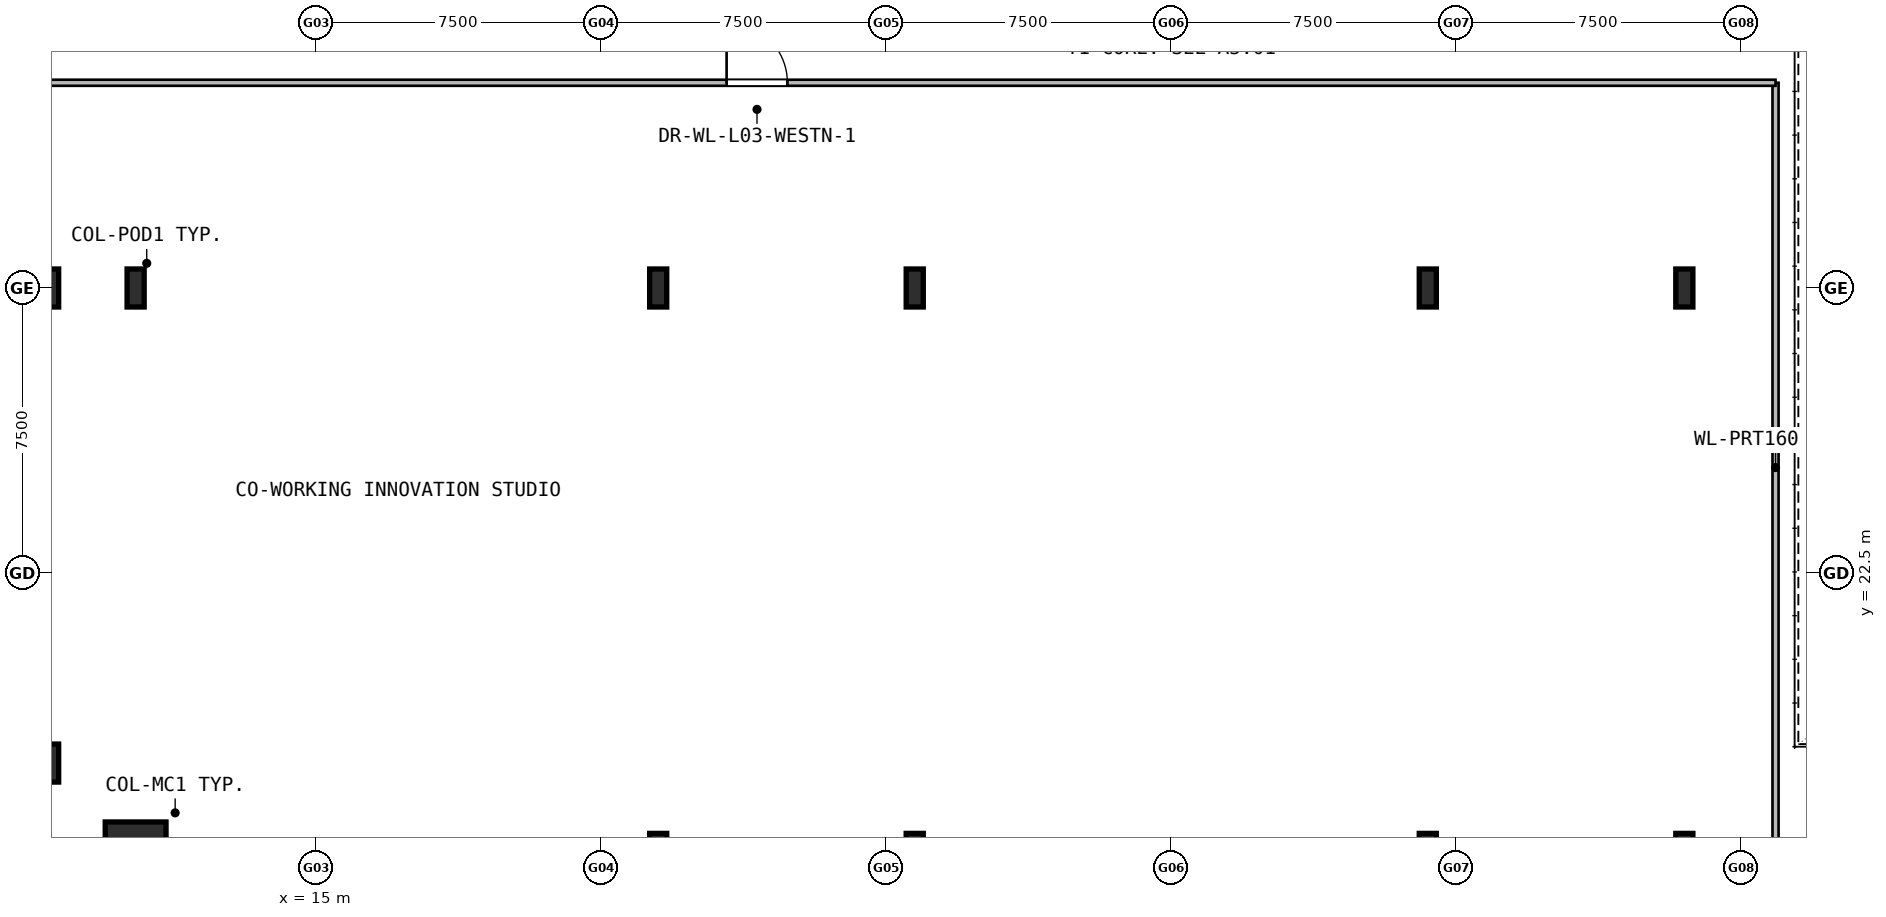
"""IFC4 building model, lengths in metres.
Left out: names, types, materials, properties, quantities, classifications, styles, units other than length and angle.
Written with IfcOpenShell. Run it as: python <this file> out.ifc"""

import sys

from ifc_helpers import new_model, si_unit, direction, frame, frame_2d, origin, origin_2d, place, context, subcontext, project, spatial, rectangle, hollow_rectangle, i_section, extrude, element, fill, save


model = new_model("IFC4")
c1 = context("Model", 3, precision=1e-05, world=origin(), true_north=direction((0.0, 1.0)))
c2 = subcontext(c1, "Body", "Model", "MODEL_VIEW")
j1 = project(units=[si_unit("LENGTHUNIT", "METRE"), si_unit("PLANEANGLEUNIT", "RADIAN")], contexts=[c1])
p1 = place(None, origin())
s1 = spatial("IfcSite", under=j1, at=p1, CompositionType="ELEMENT")
p2 = place(p1, origin())
s2 = spatial("IfcBuilding", under=s1, at=p2, CompositionType="ELEMENT")
p3 = place(p2, frame((0.0, 0.0, 15.6)))
s3 = spatial("IfcBuildingStorey", under=s2, at=p3, CompositionType="ELEMENT", Elevation=15.6)
p4 = place(p3, frame((10.25, 15.15, 0.0), z_axis=(0.0, 0.0, 1.0), x_axis=(1.0, 0.0, 0.0)))
e1 = element("IfcColumn", 1, at=p4, inside=s3, PredefinedType="COLUMN", context=c2, shape_type="SweptSolid", body=[
    extrude(hollow_rectangle(XDim=1.6, YDim=1.6, WallThickness=0.04, at=origin_2d()), origin(), (0.0, 0.0, 1.0), 4.8),
])
for number, where, z_axis, x_axis in (
    (2, (10.25, 30.0, 0.0), (0.0, 0.0, 1.0), (1.0, 0.0, 0.0)),
    (3, (24.0, 15.15, 0.0), (0.0, 0.0, 1.0), (1.0, 0.0, 0.0)),
    (4, (24.0, 30.0, 0.0), (0.0, 0.0, 1.0), (1.0, 0.0, 0.0)),
    (5, (30.75, 15.15, 0.0), (0.0, 0.0, 1.0), (1.0, 0.0, 0.0)),
    (6, (30.75, 30.0, 0.0), (0.0, 0.0, 1.0), (1.0, 0.0, 0.0)),
    (7, (44.25, 15.15, 0.0), (0.0, 0.0, 1.0), (1.0, 0.0, 0.0)),
    (8, (44.25, 30.0, 0.0), (0.0, 0.0, 1.0), (1.0, 0.0, 0.0)),
    (9, (51.0, 15.15, 0.0), (0.0, 0.0, 1.0), (1.0, 0.0, 0.0)),
    (10, (51.0, 30.0, 0.0), (0.0, 0.0, 1.0), (1.0, 0.0, 0.0)),
    (11, (8.0, 17.5, 0.0), (0.0, 0.0, 1.0), (1.0, 0.0, 0.0)),
    (12, (8.0, 30.0, 0.0), (0.0, 0.0, 1.0), (1.0, 0.0, 0.0)),
):
    element("IfcColumn", number, at=place(p3, frame(where, z_axis=z_axis, x_axis=x_axis)), inside=s3, PredefinedType="COLUMN", context=c2, shape_type="SweptSolid", body=[
        extrude(i_section(OverallWidth=0.45, OverallDepth=1.0, WebThickness=0.022, FlangeThickness=0.04, at=origin_2d()), origin(), (0.0, 0.0, 1.0), 4.8),
    ])
p5 = place(p3, frame((53.4, 15.15, 0.0), z_axis=(0.0, 0.0, 1.0), x_axis=(0.0, 1.0, 0.0)))
e13 = element("IfcWall", 13, at=p5, inside=s3, PredefinedType="PARTITIONING", context=c2, shape_type="SweptSolid", body=[
    extrude(rectangle(XDim=20.25, YDim=0.16, at=frame_2d((10.125, 0.0))), origin(), (0.0, 0.0, 1.0), 4.48),
])
p6 = place(p3, frame((7.65, 35.4, 0.0), z_axis=(0.0, 0.0, 1.0), x_axis=(1.0, 0.0, 0.0)))
e14 = element("IfcWall", 14, at=p6, inside=s3, PredefinedType="PARTITIONING", context=c2, shape_type="SweptSolid", body=[
    extrude(rectangle(XDim=45.75, YDim=0.16, at=frame_2d((22.875, 0.0))), origin(), (0.0, 0.0, 1.0), 4.48),
])
p7 = place(p6, frame((18.15, 0.0, 0.0)))
e15 = element("IfcOpeningElement", 15, at=p7, cuts=e14, PredefinedType="OPENING", context=c2, shape_type="SweptSolid", body=[
    extrude(rectangle(XDim=1.6, YDim=2.2, at=frame_2d((0.8, 1.1))), frame((0.0, 0.09, 0.0), z_axis=(0.0, -1.0, 0.0), x_axis=(1.0, 0.0, 0.0)), (0.0, 0.0, 1.0), 0.18),
])
p8 = place(p7, origin())
e16 = element("IfcDoor", 16, at=p8, inside=s3, OperationType="DOUBLE_DOOR_SINGLE_SWING", PredefinedType="DOOR", context=c2, shape_type="SweptSolid", body=[
    extrude(rectangle(XDim=1.6, YDim=2.2, at=frame_2d((0.8, 1.1))), frame((0.0, 0.025, 0.0), z_axis=(0.0, -1.0, 0.0), x_axis=(1.0, 0.0, 0.0)), (0.0, 0.0, 1.0), 0.05),
])
fill(e15, e16)
save(model, sys.argv[1])
